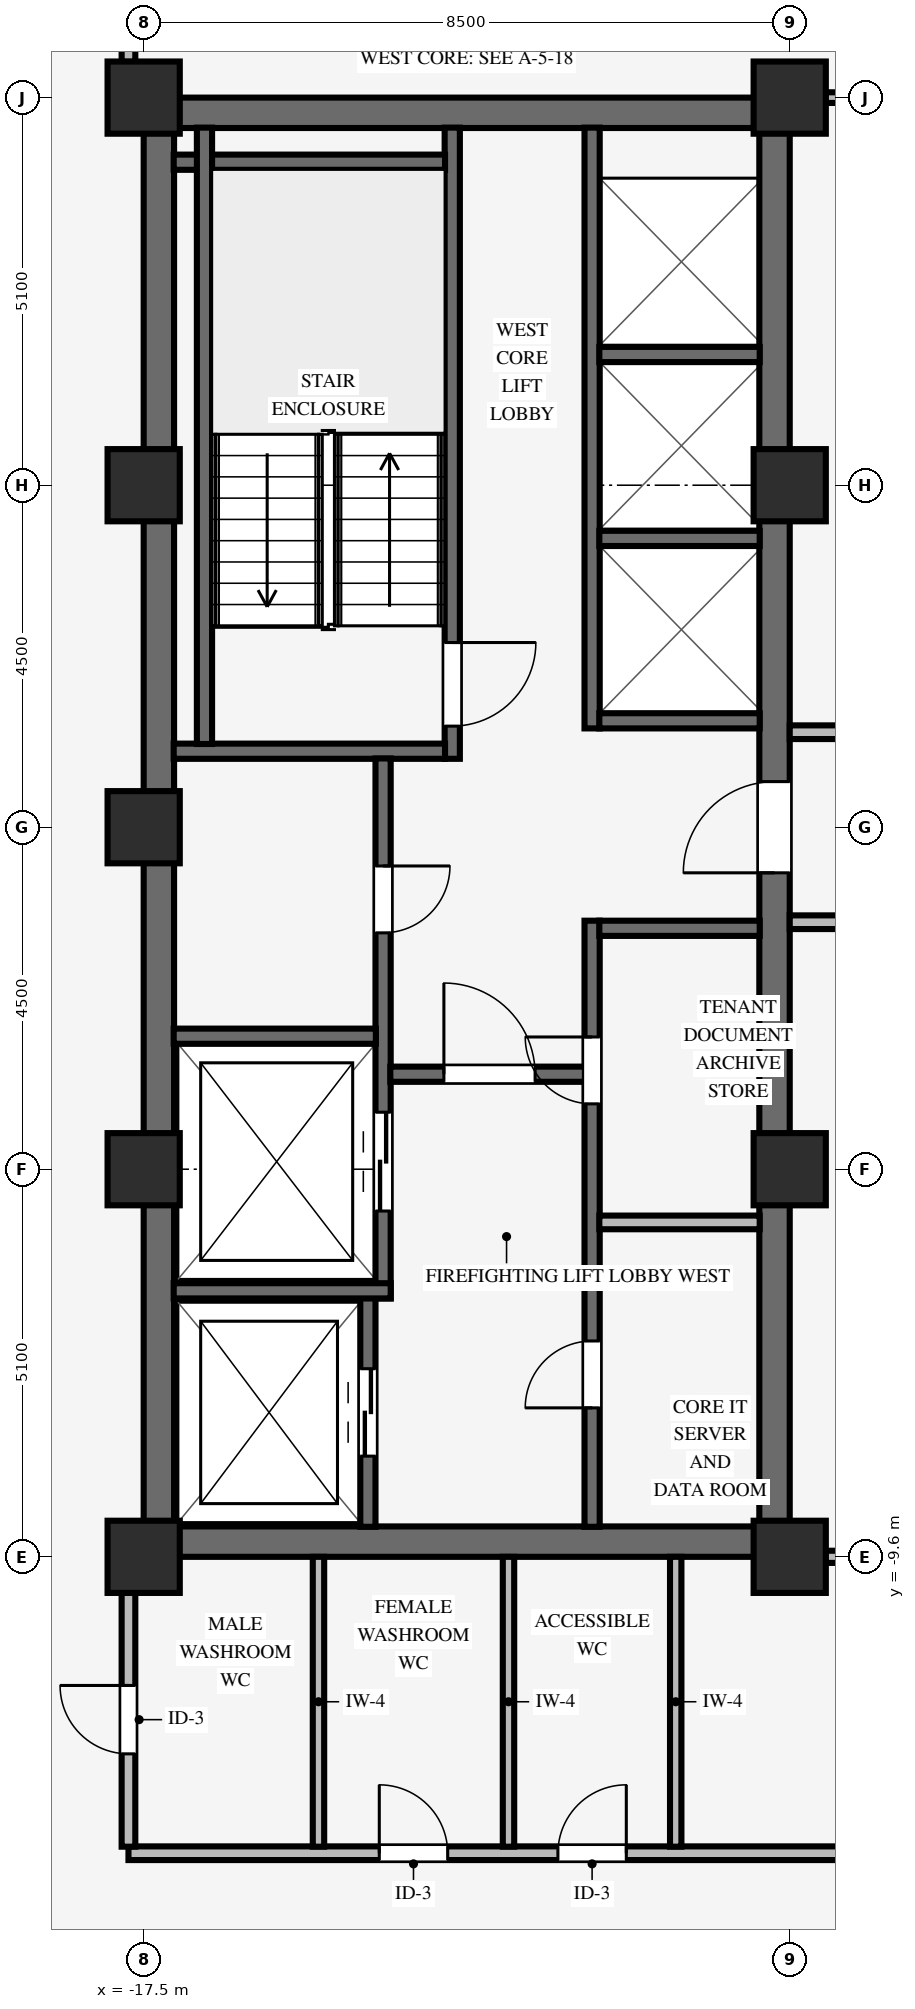
"""IFC4 building model, lengths in metres.
Left out: names, types, materials, properties, quantities, classifications, styles, units other than length and angle.
Written with IfcOpenShell. Run it as: python <this file> out.ifc"""

import sys

from ifc_helpers import new_model, si_unit, direction, frame, frame_2d, origin, origin_2d, place, context, subcontext, project, spatial, rectangle, extrude, source, transform, mapped, element, fill, save


model = new_model("IFC4")
c1 = context("Model", 3, precision=1e-05, world=origin(), true_north=direction((0.0, 1.0)))
c2 = subcontext(c1, "Body", "Model", "MODEL_VIEW")
j1 = project(units=[si_unit("LENGTHUNIT", "METRE"), si_unit("PLANEANGLEUNIT", "RADIAN")], contexts=[c1])
p1 = place(None, origin())
s1 = spatial("IfcSite", under=j1, at=p1, CompositionType="ELEMENT")
p2 = place(p1, origin())
s2 = spatial("IfcBuilding", under=s1, at=p2, CompositionType="ELEMENT")
p3 = place(p2, frame((0.0, 0.0, 127.5)))
s3 = spatial("IfcBuildingStorey", under=s2, at=p3, CompositionType="ELEMENT", Elevation=127.5)
for number, where, z_axis, x_axis in (
    (1, (-17.5, -9.4, 0.0), (0.0, 0.0, 1.0), (1.0, 0.0, 0.0)),
    (2, (-17.5, 9.4, 0.0), (0.0, 0.0, 1.0), (1.0, 0.0, 0.0)),
):
    element("IfcWall", number, at=place(p3, frame(where, z_axis=z_axis, x_axis=x_axis)), inside=s3, PredefinedType="SHEAR", context=c2, shape_type="SweptSolid", body=[
        extrude(rectangle(XDim=8.5, YDim=0.4, at=frame_2d((4.25, 0.0))), origin(), (0.0, 0.0, 1.0), 3.37),
    ])
p4 = place(p3, frame((-17.3, -9.205, 0.0), z_axis=(0.0, 0.0, 1.0), x_axis=(0.0, 1.0, 0.0)))
e3 = element("IfcWall", 3, at=p4, inside=s3, PredefinedType="SHEAR", context=c2, shape_type="SweptSolid", body=[
    extrude(rectangle(XDim=18.41, YDim=0.4, at=frame_2d((9.205, 0.0))), origin(), (0.0, 0.0, 1.0), 3.37),
])
p5 = place(p3, frame((-9.2, -9.205, 0.0), z_axis=(0.0, 0.0, 1.0), x_axis=(0.0, 1.0, 0.0)))
e4 = element("IfcWall", 4, at=p5, inside=s3, PredefinedType="SHEAR", context=c2, shape_type="SweptSolid", body=[
    extrude(rectangle(XDim=18.41, YDim=0.4, at=frame_2d((9.205, 0.0))), origin(), (0.0, 0.0, 1.0), 3.37),
])
p6 = place(p5, frame((8.605, 0.0, 0.0)))
e5 = element("IfcOpeningElement", 5, at=p6, cuts=e4, PredefinedType="OPENING", context=c2, shape_type="SweptSolid", body=[
    extrude(rectangle(XDim=1.2, YDim=2.15, at=frame_2d((0.6, 1.075))), frame((0.0, 0.21, 0.0), z_axis=(0.0, -1.0, 0.0), x_axis=(1.0, 0.0, 0.0)), (0.0, 0.0, 1.0), 0.42),
])
for number, where, z_axis, x_axis in (
    (6, (-17.5, -9.6, 0.0), (0.0, 0.0, 1.0), (1.0, 0.0, 0.0)),
    (7, (-17.5, -4.5, 0.0), (0.0, 0.0, 1.0), (1.0, 0.0, 0.0)),
    (8, (-17.5, 4.5, 0.0), (0.0, 0.0, 1.0), (1.0, 0.0, 0.0)),
    (9, (-17.5, 9.6, 0.0), (0.0, 0.0, 1.0), (1.0, 0.0, 0.0)),
    (10, (-9.0, -9.6, 0.0), (0.0, 0.0, 1.0), (1.0, 0.0, 0.0)),
    (11, (-9.0, -4.5, 0.0), (0.0, 0.0, 1.0), (1.0, 0.0, 0.0)),
    (12, (-9.0, 4.5, 0.0), (0.0, 0.0, 1.0), (1.0, 0.0, 0.0)),
    (13, (-9.0, 9.6, 0.0), (0.0, 0.0, 1.0), (1.0, 0.0, 0.0)),
    (14, (-17.5, 0.0, 0.0), (0.0, 0.0, 1.0), (1.0, 0.0, 0.0)),
):
    element("IfcColumn", number, at=place(p3, frame(where, z_axis=z_axis, x_axis=x_axis)), inside=s3, PredefinedType="COLUMN", context=c2, shape_type="SweptSolid", body=[
        extrude(rectangle(XDim=0.95, YDim=0.95, at=origin_2d()), origin(), (0.0, 0.0, 1.0), 3.37),
    ])
p7 = place(p3, frame((-13.44, 0.9, 0.0), z_axis=(0.0, 0.0, 1.0), x_axis=(0.0, 1.0, 0.0)))
e15 = element("IfcWall", 15, at=p7, inside=s3, PredefinedType="SHEAR", context=c2, shape_type="SweptSolid", body=[
    extrude(rectangle(XDim=8.305, YDim=0.2, at=frame_2d((4.153, 0.0))), origin(), (0.0, 0.0, 1.0), 3.37),
])
p8 = place(p7, frame((1.53, 0.0, 0.0), z_axis=(0.0, 0.0, 1.0), x_axis=(-1.0, 0.0, 0.0)))
e16 = element("IfcOpeningElement", 16, at=p8, cuts=e15, PredefinedType="OPENING", context=c2, shape_type="SweptSolid", body=[
    extrude(rectangle(XDim=1.1, YDim=2.15, at=frame_2d((0.55, 1.075))), frame((0.0, 0.11, 0.0), z_axis=(0.0, -1.0, 0.0), x_axis=(1.0, 0.0, 0.0)), (0.0, 0.0, 1.0), 0.22),
])
for number, where, z_axis, x_axis in (
    (17, (-17.105, 1.0, 0.0), (0.0, 0.0, 1.0), (1.0, 0.0, 0.0)),
    (18, (-17.105, 8.75, 0.0), (0.0, 0.0, 1.0), (1.0, 0.0, 0.0)),
):
    element("IfcWall", number, at=place(p3, frame(where, z_axis=z_axis, x_axis=x_axis)), inside=s3, PredefinedType="SHEAR", context=c2, shape_type="SweptSolid", body=[
        extrude(rectangle(XDim=3.57, YDim=0.2, at=frame_2d((1.785, 0.0))), origin(), (0.0, 0.0, 1.0), 3.37),
    ])
p9 = place(p3, frame((-16.7, 1.095, 0.0), z_axis=(0.0, 0.0, 1.0), x_axis=(0.0, 1.0, 0.0)))
e19 = element("IfcWall", 19, at=p9, inside=s3, PredefinedType="SHEAR", context=c2, shape_type="SweptSolid", body=[
    extrude(rectangle(XDim=8.11, YDim=0.2, at=frame_2d((4.055, 0.0))), origin(), (0.0, 0.0, 1.0), 3.37),
])
p10 = place(p3, frame((-14.55, -9.205, 0.0), z_axis=(0.0, 0.0, 1.0), x_axis=(0.0, 1.0, 0.0)))
e20 = element("IfcWall", 20, at=p10, inside=s3, PredefinedType="SHEAR", context=c2, shape_type="SweptSolid", body=[
    extrude(rectangle(XDim=3.01, YDim=0.2, at=frame_2d((1.505, 0.0))), origin(), (0.0, 0.0, 1.0), 3.37),
])
p11 = place(p10, frame((0.93, 0.0, 0.0)))
e21 = element("IfcOpeningElement", 21, at=p11, cuts=e20, PredefinedType="OPENING", context=c2, shape_type="SweptSolid", body=[
    extrude(rectangle(XDim=1.15, YDim=2.15, at=frame_2d((0.575, 1.075))), frame((0.0, 0.11, 0.0), z_axis=(0.0, -1.0, 0.0), x_axis=(1.0, 0.0, 0.0)), (0.0, 0.0, 1.0), 0.22),
])
p12 = place(p3, frame((-14.35, -6.2, 0.0), z_axis=(0.0, 0.0, 1.0), x_axis=(0.0, 1.0, 0.0)))
e22 = element("IfcWall", 22, at=p12, inside=s3, PredefinedType="SHEAR", context=c2, shape_type="SweptSolid", body=[
    extrude(rectangle(XDim=7.105, YDim=0.2, at=frame_2d((3.552, 0.0))), origin(), (0.0, 0.0, 1.0), 3.37),
])
p13 = place(p12, frame((5.69, 0.0, 0.0), z_axis=(0.0, 0.0, 1.0), x_axis=(-1.0, 0.0, 0.0)))
e23 = element("IfcOpeningElement", 23, at=p13, cuts=e22, PredefinedType="OPENING", context=c2, shape_type="SweptSolid", body=[
    extrude(rectangle(XDim=0.88, YDim=2.1, at=frame_2d((0.44, 1.05))), frame((0.0, 0.11, 0.0), z_axis=(0.0, -1.0, 0.0), x_axis=(1.0, 0.0, 0.0)), (0.0, 0.0, 1.0), 0.22),
])
p14 = place(p12, frame((1.15, 0.0, 0.0)))
e24 = element("IfcOpeningElement", 24, at=p14, cuts=e22, PredefinedType="OPENING", context=c2, shape_type="SweptSolid", body=[
    extrude(rectangle(XDim=1.3, YDim=2.2, at=frame_2d((0.65, 1.1))), frame((0.0, 0.11, 0.0), z_axis=(0.0, -1.0, 0.0), x_axis=(1.0, 0.0, 0.0)), (0.0, 0.0, 1.0), 0.22),
])
p15 = place(p3, frame((-17.105, -6.1, 0.0), z_axis=(0.0, 0.0, 1.0), x_axis=(1.0, 0.0, 0.0)))
e25 = element("IfcWall", 25, at=p15, inside=s3, PredefinedType="SHEAR", context=c2, shape_type="SweptSolid", body=[
    extrude(rectangle(XDim=2.855, YDim=0.2, at=frame_2d((1.427, 0.0))), origin(), (0.0, 0.0, 1.0), 3.37),
])
p16 = place(p3, frame((-17.105, -2.75, 0.0), z_axis=(0.0, 0.0, 1.0), x_axis=(1.0, 0.0, 0.0)))
e26 = element("IfcWall", 26, at=p16, inside=s3, PredefinedType="SHEAR", context=c2, shape_type="SweptSolid", body=[
    extrude(rectangle(XDim=2.66, YDim=0.2, at=frame_2d((1.33, 0.0))), origin(), (0.0, 0.0, 1.0), 3.37),
])
p17 = place(p3, frame((-11.6, -9.205, 0.0), z_axis=(0.0, 0.0, 1.0), x_axis=(0.0, 1.0, 0.0)))
e27 = element("IfcWall", 27, at=p17, inside=s3, PredefinedType="SHEAR", context=c2, shape_type="SweptSolid", body=[
    extrude(rectangle(XDim=7.975, YDim=0.2, at=frame_2d((3.988, 0.0))), origin(), (0.0, 0.0, 1.0), 3.37),
])
p18 = place(p17, frame((1.565, 0.0, 0.0)))
e28 = element("IfcOpeningElement", 28, at=p18, cuts=e27, PredefinedType="OPENING", context=c2, shape_type="SweptSolid", body=[
    extrude(rectangle(XDim=0.88, YDim=2.1, at=frame_2d((0.44, 1.05))), frame((0.0, 0.11, 0.0), z_axis=(0.0, -1.0, 0.0), x_axis=(1.0, 0.0, 0.0)), (0.0, 0.0, 1.0), 0.22),
])
p19 = place(p17, frame((5.565, 0.0, 0.0)))
e29 = element("IfcOpeningElement", 29, at=p19, cuts=e27, PredefinedType="OPENING", context=c2, shape_type="SweptSolid", body=[
    extrude(rectangle(XDim=0.88, YDim=2.1, at=frame_2d((0.44, 1.05))), frame((0.0, 0.11, 0.0), z_axis=(0.0, -1.0, 0.0), x_axis=(1.0, 0.0, 0.0)), (0.0, 0.0, 1.0), 0.22),
])
p20 = place(p3, frame((-14.255, -3.25, 0.0), z_axis=(0.0, 0.0, 1.0), x_axis=(1.0, 0.0, 0.0)))
e30 = element("IfcWall", 30, at=p20, inside=s3, PredefinedType="SHEAR", context=c2, shape_type="SweptSolid", body=[
    extrude(rectangle(XDim=2.56, YDim=0.2, at=frame_2d((1.28, 0.0))), origin(), (0.0, 0.0, 1.0), 3.37),
])
p21 = place(p20, frame((0.705, 0.0, 0.0)))
e31 = element("IfcOpeningElement", 31, at=p21, cuts=e30, PredefinedType="OPENING", context=c2, shape_type="SweptSolid", body=[
    extrude(rectangle(XDim=1.2, YDim=2.15, at=frame_2d((0.6, 1.075))), frame((0.0, 0.11, 0.0), z_axis=(0.0, -1.0, 0.0), x_axis=(1.0, 0.0, 0.0)), (0.0, 0.0, 1.0), 0.22),
])
p22 = place(p3, frame((-11.505, -1.33, 0.0), z_axis=(0.0, 0.0, 1.0), x_axis=(1.0, 0.0, 0.0)))
e32 = element("IfcWall", 32, at=p22, inside=s3, PredefinedType="SHEAR", context=c2, shape_type="SweptSolid", body=[
    extrude(rectangle(XDim=2.11, YDim=0.2, at=frame_2d((1.055, 0.0))), origin(), (0.0, 0.0, 1.0), 3.37),
])
p23 = place(p3, frame((-11.505, -5.2, 0.0), z_axis=(0.0, 0.0, 1.0), x_axis=(1.0, 0.0, 0.0)))
e33 = element("IfcWall", 33, at=p23, inside=s3, PredefinedType="PARTITIONING", context=c2, shape_type="SweptSolid", body=[
    extrude(rectangle(XDim=2.11, YDim=0.18, at=frame_2d((1.055, 0.0))), origin(), (0.0, 0.0, 1.0), 3.36),
])
p24 = place(p3, frame((-11.6, 1.3, 0.0), z_axis=(0.0, 0.0, 1.0), x_axis=(0.0, 1.0, 0.0)))
e34 = element("IfcWall", 34, at=p24, inside=s3, PredefinedType="SHEAR", context=c2, shape_type="SweptSolid", body=[
    extrude(rectangle(XDim=7.905, YDim=0.2, at=frame_2d((3.953, 0.0))), origin(), (0.0, 0.0, 1.0), 3.37),
])
for number, where, z_axis, x_axis in (
    (35, (-11.505, 1.4, 0.0), (0.0, 0.0, 1.0), (1.0, 0.0, 0.0)),
    (36, (-11.505, 3.8, 0.0), (0.0, 0.0, 1.0), (1.0, 0.0, 0.0)),
    (37, (-11.505, 6.22, 0.0), (0.0, 0.0, 1.0), (1.0, 0.0, 0.0)),
):
    element("IfcWall", number, at=place(p3, frame(where, z_axis=z_axis, x_axis=x_axis)), inside=s3, PredefinedType="SHEAR", context=c2, shape_type="SweptSolid", body=[
        extrude(rectangle(XDim=2.11, YDim=0.2, at=frame_2d((1.055, 0.0))), origin(), (0.0, 0.0, 1.0), 3.37),
    ])
p25 = place(p3, frame((-17.7, -13.5, 0.0), z_axis=(0.0, 0.0, 1.0), x_axis=(1.0, 0.0, 0.0)))
e38 = element("IfcWall", 38, at=p25, inside=s3, PredefinedType="PARTITIONING", context=c2, shape_type="SweptSolid", body=[
    extrude(rectangle(XDim=24.3, YDim=0.18, at=frame_2d((12.15, 0.0))), origin(), (0.0, 0.0, 1.0), 2.998),
])
p26 = place(p25, frame((19.47, 0.0, 0.0)))
e39 = element("IfcOpeningElement", 39, at=p26, cuts=e38, PredefinedType="OPENING", context=c2, shape_type="SweptSolid", body=[
    extrude(rectangle(XDim=0.96, YDim=2.1, at=frame_2d((0.48, 1.05))), frame((0.0, 0.1, 0.0), z_axis=(0.0, -1.0, 0.0), x_axis=(1.0, 0.0, 0.0)), (0.0, 0.0, 1.0), 0.2),
])
p27 = place(p25, frame((10.92, 0.0, 0.0)))
e40 = element("IfcOpeningElement", 40, at=p27, cuts=e38, PredefinedType="OPENING", context=c2, shape_type="SweptSolid", body=[
    extrude(rectangle(XDim=0.96, YDim=2.1, at=frame_2d((0.48, 1.05))), frame((0.0, 0.1, 0.0), z_axis=(0.0, -1.0, 0.0), x_axis=(1.0, 0.0, 0.0)), (0.0, 0.0, 1.0), 0.2),
])
p28 = place(p25, frame((3.3, 0.0, 0.0)))
e41 = element("IfcOpeningElement", 41, at=p28, cuts=e38, PredefinedType="OPENING", context=c2, shape_type="SweptSolid", body=[
    extrude(rectangle(XDim=0.9, YDim=2.1, at=frame_2d((0.45, 1.05))), frame((0.0, 0.1, 0.0), z_axis=(0.0, -1.0, 0.0), x_axis=(1.0, 0.0, 0.0)), (0.0, 0.0, 1.0), 0.2),
])
p29 = place(p25, frame((5.65, 0.0, 0.0)))
e42 = element("IfcOpeningElement", 42, at=p29, cuts=e38, PredefinedType="OPENING", context=c2, shape_type="SweptSolid", body=[
    extrude(rectangle(XDim=0.9, YDim=2.1, at=frame_2d((0.45, 1.05))), frame((0.0, 0.1, 0.0), z_axis=(0.0, -1.0, 0.0), x_axis=(1.0, 0.0, 0.0)), (0.0, 0.0, 1.0), 0.2),
])
p30 = place(p3, frame((-8.529, -9.6, 0.0), z_axis=(0.0, 0.0, 1.0), x_axis=(1.0, 0.0, 0.0)))
e43 = element("IfcWall", 43, at=p30, inside=s3, PredefinedType="PARTITIONING", context=c2, shape_type="SweptSolid", body=[
    extrude(rectangle(XDim=8.353, YDim=0.16, at=frame_2d((4.177, 0.0))), origin(), (0.0, 0.0, 1.0), 2.405),
])
p31 = place(p3, frame((-9.0, -1.25, 0.0), z_axis=(0.0, 0.0, 1.0), x_axis=(1.0, 0.0, 0.0)))
e44 = element("IfcWall", 44, at=p31, inside=s3, PredefinedType="PARTITIONING", context=c2, shape_type="SweptSolid", body=[
    extrude(rectangle(XDim=15.6, YDim=0.18, at=frame_2d((7.8, 0.0))), origin(), (0.0, 0.0, 1.0), 3.36),
])
p32 = place(p31, frame((7.32, 0.0, 0.0)))
e45 = element("IfcOpeningElement", 45, at=p32, cuts=e44, PredefinedType="OPENING", context=c2, shape_type="SweptSolid", body=[
    extrude(rectangle(XDim=0.96, YDim=2.1, at=frame_2d((0.48, 1.05))), frame((0.0, 0.1, 0.0), z_axis=(0.0, -1.0, 0.0), x_axis=(1.0, 0.0, 0.0)), (0.0, 0.0, 1.0), 0.2),
])
p33 = place(p3, frame((-9.0, 1.25, 0.0), z_axis=(0.0, 0.0, 1.0), x_axis=(1.0, 0.0, 0.0)))
e46 = element("IfcWall", 46, at=p33, inside=s3, PredefinedType="PARTITIONING", context=c2, shape_type="SweptSolid", body=[
    extrude(rectangle(XDim=15.6, YDim=0.18, at=frame_2d((7.8, 0.0))), origin(), (0.0, 0.0, 1.0), 3.36),
])
p34 = place(p33, frame((3.32, 0.0, 0.0)))
e47 = element("IfcOpeningElement", 47, at=p34, cuts=e46, PredefinedType="OPENING", context=c2, shape_type="SweptSolid", body=[
    extrude(rectangle(XDim=0.96, YDim=2.1, at=frame_2d((0.48, 1.05))), frame((0.0, 0.1, 0.0), z_axis=(0.0, -1.0, 0.0), x_axis=(1.0, 0.0, 0.0)), (0.0, 0.0, 1.0), 0.2),
])
p35 = place(p3, frame((-8.529, 9.6, 0.0), z_axis=(0.0, 0.0, 1.0), x_axis=(1.0, 0.0, 0.0)))
e48 = element("IfcWall", 48, at=p35, inside=s3, PredefinedType="PARTITIONING", context=c2, shape_type="SweptSolid", body=[
    extrude(rectangle(XDim=8.353, YDim=0.14, at=frame_2d((4.177, 0.0))), origin(), (0.0, 0.0, 1.0), 2.405),
])
p36 = place(p3, frame((-17.7, -13.414, 0.0), z_axis=(0.0, 0.0, 1.0), x_axis=(0.0, 1.0, 0.0)))
e49 = element("IfcWall", 49, at=p36, inside=s3, PredefinedType="PARTITIONING", context=c2, shape_type="SweptSolid", body=[
    extrude(rectangle(XDim=3.343, YDim=0.18, at=frame_2d((1.671, 0.0))), origin(), (0.0, 0.0, 1.0), 2.816),
])
p37 = place(p36, frame((1.221, 0.0, 0.0)))
e50 = element("IfcOpeningElement", 50, at=p37, cuts=e49, PredefinedType="OPENING", context=c2, shape_type="SweptSolid", body=[
    extrude(rectangle(XDim=0.9, YDim=2.1, at=frame_2d((0.45, 1.05))), frame((0.0, 0.1, 0.0), z_axis=(0.0, -1.0, 0.0), x_axis=(1.0, 0.0, 0.0)), (0.0, 0.0, 1.0), 0.2),
])
p38 = place(p3, frame((-17.7, 10.071, 0.0), z_axis=(0.0, 0.0, 1.0), x_axis=(0.0, 1.0, 0.0)))
e51 = element("IfcWall", 51, at=p38, inside=s3, PredefinedType="PARTITIONING", context=c2, shape_type="SweptSolid", body=[
    extrude(rectangle(XDim=3.343, YDim=0.18, at=frame_2d((1.671, 0.0))), origin(), (0.0, 0.0, 1.0), 2.816),
])
for number, where, z_axis, x_axis in (
    (52, (-15.2, -13.414, 0.0), (0.0, 0.0, 1.0), (0.0, 1.0, 0.0)),
    (53, (-12.7, -13.414, 0.0), (0.0, 0.0, 1.0), (0.0, 1.0, 0.0)),
    (54, (-10.5, -13.414, 0.0), (0.0, 0.0, 1.0), (0.0, 1.0, 0.0)),
):
    element("IfcWall", number, at=place(p3, frame(where, z_axis=z_axis, x_axis=x_axis)), inside=s3, PredefinedType="PARTITIONING", context=c2, shape_type="SweptSolid", body=[
        extrude(rectangle(XDim=3.814, YDim=0.15, at=frame_2d((1.907, 0.0))), origin(), (0.0, 0.0, 1.0), 3.36),
    ])
m1 = source(origin(), c2, "Body", "SweptSolid", [
    extrude(rectangle(XDim=1.1, YDim=2.15, at=frame_2d((0.55, 1.075))), frame((0.0, 0.025, 0.0), z_axis=(0.0, -1.0, 0.0), x_axis=(1.0, 0.0, 0.0)), (0.0, 0.0, 1.0), 0.05),
])
p39 = place(p8, origin())
e55 = element("IfcDoor", 55, at=p39, inside=s3, OperationType="SINGLE_SWING_LEFT", PredefinedType="DOOR", context=c2, shape_type="MappedRepresentation", body=[
    mapped(m1, transform((0.0, 0.0, 0.0), scale=1.0)),
])
fill(e16, e55)
m2 = source(origin(), c2, "Body", "SweptSolid", [
    extrude(rectangle(XDim=0.88, YDim=2.1, at=frame_2d((0.44, 1.05))), frame((0.0, 0.025, 0.0), z_axis=(0.0, -1.0, 0.0), x_axis=(1.0, 0.0, 0.0)), (0.0, 0.0, 1.0), 0.05),
])
p40 = place(p13, origin())
e56 = element("IfcDoor", 56, at=p40, inside=s3, OperationType="SINGLE_SWING_LEFT", PredefinedType="DOOR", context=c2, shape_type="MappedRepresentation", body=[
    mapped(m2, transform((0.0, 0.0, 0.0), scale=1.0)),
])
fill(e23, e56)
m3 = source(origin(), c2, "Body", "SweptSolid", [
    extrude(rectangle(XDim=1.2, YDim=2.15, at=frame_2d((0.6, 1.075))), frame((0.0, 0.025, 0.0), z_axis=(0.0, -1.0, 0.0), x_axis=(1.0, 0.0, 0.0)), (0.0, 0.0, 1.0), 0.05),
])
p41 = place(p21, origin())
e57 = element("IfcDoor", 57, at=p41, inside=s3, OperationType="SINGLE_SWING_LEFT", PredefinedType="DOOR", context=c2, shape_type="MappedRepresentation", body=[
    mapped(m3, transform((0.0, 0.0, 0.0), scale=1.0)),
])
fill(e31, e57)
p42 = place(p18, origin())
e58 = element("IfcDoor", 58, at=p42, inside=s3, OperationType="SINGLE_SWING_LEFT", PredefinedType="DOOR", context=c2, shape_type="MappedRepresentation", body=[
    mapped(m2, transform((0.0, 0.0, 0.0), scale=1.0)),
])
fill(e28, e58)
p43 = place(p19, origin())
e59 = element("IfcDoor", 59, at=p43, inside=s3, OperationType="SINGLE_SWING_RIGHT", PredefinedType="DOOR", context=c2, shape_type="MappedRepresentation", body=[
    mapped(m2, transform((0.0, 0.0, 0.0), scale=1.0)),
])
fill(e29, e59)
p44 = place(p6, origin())
e60 = element("IfcDoor", 60, at=p44, inside=s3, OperationType="SINGLE_SWING_LEFT", PredefinedType="DOOR", context=c2, shape_type="MappedRepresentation", body=[
    mapped(m3, transform((0.0, 0.0, 0.0), scale=1.0)),
])
fill(e5, e60)
m4 = source(origin(), c2, "Body", "SweptSolid", [
    extrude(rectangle(XDim=1.15, YDim=2.15, at=frame_2d((0.575, 1.075))), frame((0.0, 0.025, 0.0), z_axis=(0.0, -1.0, 0.0), x_axis=(1.0, 0.0, 0.0)), (0.0, 0.0, 1.0), 0.05),
])
p45 = place(p11, origin())
e61 = element("IfcDoor", 61, at=p45, inside=s3, OperationType="DOUBLE_DOOR_SLIDING", PredefinedType="DOOR", context=c2, shape_type="MappedRepresentation", body=[
    mapped(m4, transform((0.0, 0.0, 0.0), scale=1.0)),
])
fill(e21, e61)
m5 = source(origin(), c2, "Body", "SweptSolid", [
    extrude(rectangle(XDim=1.3, YDim=2.2, at=frame_2d((0.65, 1.1))), frame((0.0, 0.025, 0.0), z_axis=(0.0, -1.0, 0.0), x_axis=(1.0, 0.0, 0.0)), (0.0, 0.0, 1.0), 0.05),
])
p46 = place(p14, origin())
e62 = element("IfcDoor", 62, at=p46, inside=s3, OperationType="DOUBLE_DOOR_SLIDING", PredefinedType="DOOR", context=c2, shape_type="MappedRepresentation", body=[
    mapped(m5, transform((0.0, 0.0, 0.0), scale=1.0)),
])
fill(e24, e62)
m6 = source(origin(), c2, "Body", "SweptSolid", [
    extrude(rectangle(XDim=0.9, YDim=2.1, at=frame_2d((0.45, 1.05))), frame((0.0, 0.025, 0.0), z_axis=(0.0, -1.0, 0.0), x_axis=(1.0, 0.0, 0.0)), (0.0, 0.0, 1.0), 0.05),
])
p47 = place(p37, origin())
e63 = element("IfcDoor", 63, at=p47, inside=s3, OperationType="SINGLE_SWING_RIGHT", PredefinedType="DOOR", context=c2, shape_type="MappedRepresentation", body=[
    mapped(m6, transform((0.0, 0.0, 0.0), scale=1.0)),
])
fill(e50, e63)
p48 = place(p28, origin())
e64 = element("IfcDoor", 64, at=p48, inside=s3, OperationType="SINGLE_SWING_LEFT", PredefinedType="DOOR", context=c2, shape_type="MappedRepresentation", body=[
    mapped(m6, transform((0.0, 0.0, 0.0), scale=1.0)),
])
fill(e41, e64)
p49 = place(p29, origin())
e65 = element("IfcDoor", 65, at=p49, inside=s3, OperationType="SINGLE_SWING_RIGHT", PredefinedType="DOOR", context=c2, shape_type="MappedRepresentation", body=[
    mapped(m6, transform((0.0, 0.0, 0.0), scale=1.0)),
])
fill(e42, e65)
save(model, sys.argv[1])
